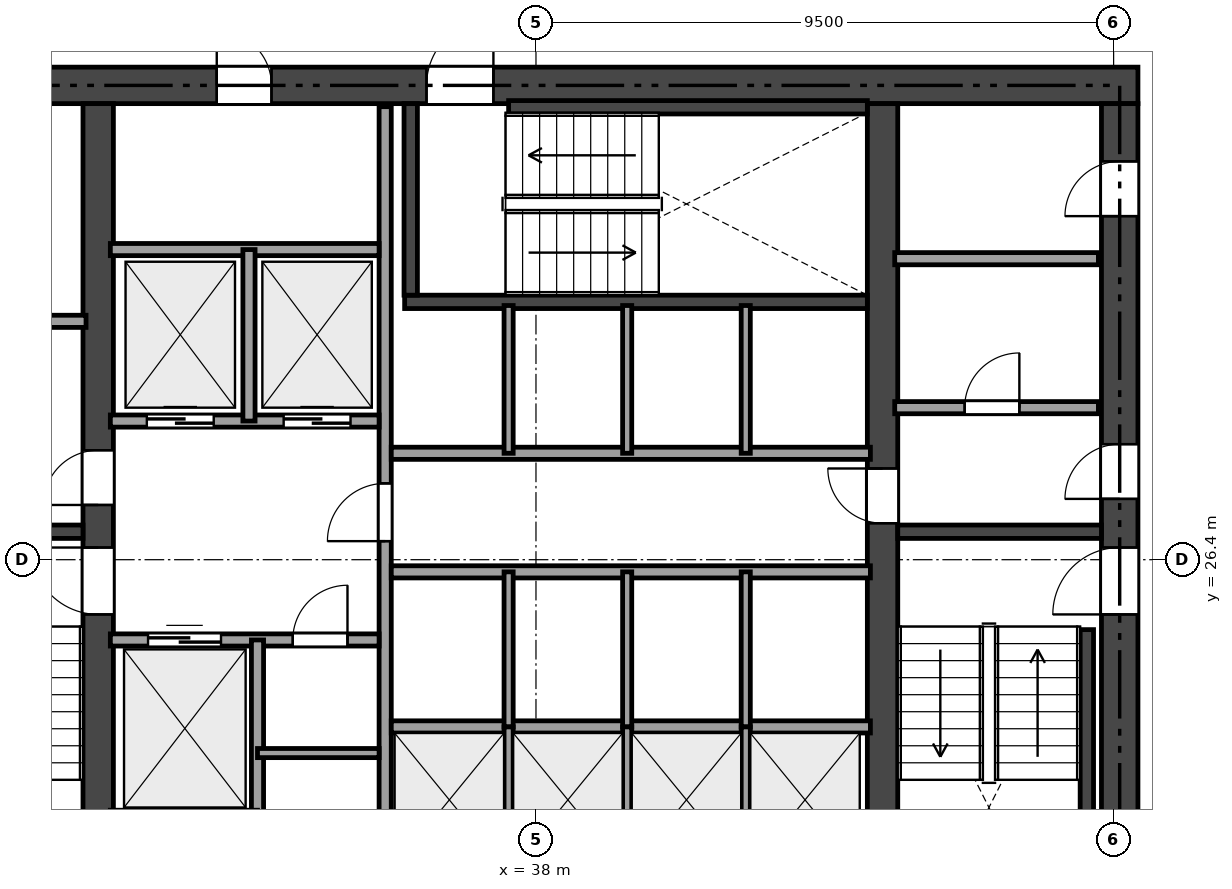
"""IFC4 building model, lengths in metres.
Left out: names, types, materials, properties, quantities, classifications, styles, units other than length and angle.
Written with IfcOpenShell. Run it as: python <this file> out.ifc"""

import sys

from ifc_helpers import new_model, si_unit, direction, frame, frame_2d, origin, place, context, subcontext, project, spatial, rectangle, extrude, element, fill, save


model = new_model("IFC4")
c1 = context("Model", 3, precision=1e-05, world=origin(), true_north=direction((0.0, 1.0)))
c2 = subcontext(c1, "Body", "Model", "MODEL_VIEW")
j1 = project(units=[si_unit("LENGTHUNIT", "METRE"), si_unit("PLANEANGLEUNIT", "RADIAN")], contexts=[c1])
p1 = place(None, origin())
s1 = spatial("IfcSite", under=j1, at=p1, CompositionType="ELEMENT")
p2 = place(p1, origin())
s2 = spatial("IfcBuilding", under=s1, at=p2, CompositionType="ELEMENT")
p3 = place(p2, frame((0.0, 0.0, 79.8)))
s3 = spatial("IfcBuildingStorey", under=s2, at=p3, CompositionType="ELEMENT", Elevation=79.8)
p4 = place(p3, frame((26.5, 34.2, 0.0), z_axis=(0.0, 0.0, 1.0), x_axis=(1.0, 0.0, 0.0)))
e1 = element("IfcWall", 1, at=p4, inside=s3, PredefinedType="SHEAR", context=c2, shape_type="SweptSolid", body=[
    extrude(rectangle(XDim=21.4, YDim=0.6, at=frame_2d((10.7, 0.0))), origin(), (0.0, 0.0, 1.0), 3.17),
])
p5 = place(p4, frame((9.7, 0.0, 0.0)))
e2 = element("IfcOpeningElement", 2, at=p5, cuts=e1, PredefinedType="OPENING", context=c2, shape_type="SweptSolid", body=[
    extrude(rectangle(XDim=1.1, YDim=2.15, at=frame_2d((0.55, 1.075))), frame((0.0, 0.31, 0.0), z_axis=(0.0, -1.0, 0.0), x_axis=(1.0, 0.0, 0.0)), (0.0, 0.0, 1.0), 0.62),
])
p6 = place(p4, frame((1.95, 0.0, 0.0)))
e3 = element("IfcOpeningElement", 3, at=p6, cuts=e1, PredefinedType="OPENING", context=c2, shape_type="SweptSolid", body=[
    extrude(rectangle(XDim=0.9, YDim=2.1, at=frame_2d((0.45, 1.05))), frame((0.0, 0.31, 0.0), z_axis=(0.0, -1.0, 0.0), x_axis=(1.0, 0.0, 0.0)), (0.0, 0.0, 1.0), 0.62),
])
p7 = place(p4, frame((6.25, 0.0, 0.0)))
e4 = element("IfcOpeningElement", 4, at=p7, cuts=e1, PredefinedType="OPENING", context=c2, shape_type="SweptSolid", body=[
    extrude(rectangle(XDim=0.9, YDim=2.1, at=frame_2d((0.45, 1.05))), frame((0.0, 0.31, 0.0), z_axis=(0.0, -1.0, 0.0), x_axis=(1.0, 0.0, 0.0)), (0.0, 0.0, 1.0), 0.62),
])
p8 = place(p3, frame((47.6, 18.9, 0.0), z_axis=(0.0, 0.0, 1.0), x_axis=(0.0, 1.0, 0.0)))
e5 = element("IfcWall", 5, at=p8, inside=s3, PredefinedType="SHEAR", context=c2, shape_type="SweptSolid", body=[
    extrude(rectangle(XDim=15.0, YDim=0.6, at=frame_2d((7.5, 0.0))), origin(), (0.0, 0.0, 1.0), 3.17),
])
p9 = place(p8, frame((6.6, 0.0, 0.0)))
e6 = element("IfcOpeningElement", 6, at=p9, cuts=e5, PredefinedType="OPENING", context=c2, shape_type="SweptSolid", body=[
    extrude(rectangle(XDim=1.1, YDim=2.15, at=frame_2d((0.55, 1.075))), frame((0.0, 0.31, 0.0), z_axis=(0.0, -1.0, 0.0), x_axis=(1.0, 0.0, 0.0)), (0.0, 0.0, 1.0), 0.62),
])
p10 = place(p8, frame((8.5, 0.0, 0.0)))
e7 = element("IfcOpeningElement", 7, at=p10, cuts=e5, PredefinedType="OPENING", context=c2, shape_type="SweptSolid", body=[
    extrude(rectangle(XDim=0.9, YDim=2.1, at=frame_2d((0.45, 1.05))), frame((0.0, 0.31, 0.0), z_axis=(0.0, -1.0, 0.0), x_axis=(1.0, 0.0, 0.0)), (0.0, 0.0, 1.0), 0.62),
])
p11 = place(p8, frame((13.15, 0.0, 0.0)))
e8 = element("IfcOpeningElement", 8, at=p11, cuts=e5, PredefinedType="OPENING", context=c2, shape_type="SweptSolid", body=[
    extrude(rectangle(XDim=0.9, YDim=2.1, at=frame_2d((0.45, 1.05))), frame((0.0, 0.31, 0.0), z_axis=(0.0, -1.0, 0.0), x_axis=(1.0, 0.0, 0.0)), (0.0, 0.0, 1.0), 0.62),
])
p12 = place(p3, frame((30.8, 18.9, 0.0), z_axis=(0.0, 0.0, 1.0), x_axis=(0.0, 1.0, 0.0)))
e9 = element("IfcWall", 9, at=p12, inside=s3, PredefinedType="SHEAR", context=c2, shape_type="SweptSolid", body=[
    extrude(rectangle(XDim=15.0, YDim=0.5, at=frame_2d((7.5, 0.0))), origin(), (0.0, 0.0, 1.0), 3.17),
])
p13 = place(p12, frame((6.6, 0.0, 0.0)))
e10 = element("IfcOpeningElement", 10, at=p13, cuts=e9, PredefinedType="OPENING", context=c2, shape_type="SweptSolid", body=[
    extrude(rectangle(XDim=1.1, YDim=2.15, at=frame_2d((0.55, 1.075))), frame((0.0, 0.26, 0.0), z_axis=(0.0, -1.0, 0.0), x_axis=(1.0, 0.0, 0.0)), (0.0, 0.0, 1.0), 0.52),
])
p14 = place(p12, frame((8.4, 0.0, 0.0)))
e11 = element("IfcOpeningElement", 11, at=p14, cuts=e9, PredefinedType="OPENING", context=c2, shape_type="SweptSolid", body=[
    extrude(rectangle(XDim=0.9, YDim=2.1, at=frame_2d((0.45, 1.05))), frame((0.0, 0.26, 0.0), z_axis=(0.0, -1.0, 0.0), x_axis=(1.0, 0.0, 0.0)), (0.0, 0.0, 1.0), 0.52),
])
p15 = place(p3, frame((43.7, 18.9, 0.0), z_axis=(0.0, 0.0, 1.0), x_axis=(0.0, 1.0, 0.0)))
e12 = element("IfcWall", 12, at=p15, inside=s3, PredefinedType="SHEAR", context=c2, shape_type="SweptSolid", body=[
    extrude(rectangle(XDim=15.0, YDim=0.5, at=frame_2d((7.5, 0.0))), origin(), (0.0, 0.0, 1.0), 3.17),
])
p16 = place(p15, frame((8.1, 0.0, 0.0)))
e13 = element("IfcOpeningElement", 13, at=p16, cuts=e12, PredefinedType="OPENING", context=c2, shape_type="SweptSolid", body=[
    extrude(rectangle(XDim=0.9, YDim=2.1, at=frame_2d((0.45, 1.05))), frame((0.0, 0.26, 0.0), z_axis=(0.0, -1.0, 0.0), x_axis=(1.0, 0.0, 0.0)), (0.0, 0.0, 1.0), 0.52),
])
p17 = place(p3, frame((27.1, 26.86, 0.0), z_axis=(0.0, 0.0, 1.0), x_axis=(1.0, 0.0, 0.0)))
e14 = element("IfcWall", 14, at=p17, inside=s3, PredefinedType="SHEAR", context=c2, shape_type="SweptSolid", body=[
    extrude(rectangle(XDim=3.45, YDim=0.22, at=frame_2d((1.725, 0.0))), origin(), (0.0, 0.0, 1.0), 3.17),
])
p18 = place(p3, frame((43.95, 26.86, 0.0), z_axis=(0.0, 0.0, 1.0), x_axis=(1.0, 0.0, 0.0)))
e15 = element("IfcWall", 15, at=p18, inside=s3, PredefinedType="SHEAR", context=c2, shape_type="SweptSolid", body=[
    extrude(rectangle(XDim=3.35, YDim=0.22, at=frame_2d((1.675, 0.0))), origin(), (0.0, 0.0, 1.0), 3.17),
])
p19 = place(p3, frame((47.06, 19.35, 0.0), z_axis=(0.0, 0.0, 1.0), x_axis=(0.0, 1.0, 0.0)))
e16 = element("IfcWall", 16, at=p19, inside=s3, PredefinedType="SHEAR", context=c2, shape_type="SweptSolid", body=[
    extrude(rectangle(XDim=5.9, YDim=0.22, at=frame_2d((2.95, 0.0))), origin(), (0.0, 0.0, 1.0), 3.17),
])
p20 = place(p3, frame((35.84, 30.64, 0.0), z_axis=(0.0, 0.0, 1.0), x_axis=(1.0, 0.0, 0.0)))
e17 = element("IfcWall", 17, at=p20, inside=s3, PredefinedType="SHEAR", context=c2, shape_type="SweptSolid", body=[
    extrude(rectangle(XDim=7.61, YDim=0.22, at=frame_2d((3.805, 0.0))), origin(), (0.0, 0.0, 1.0), 3.17),
])
p21 = place(p3, frame((35.94, 30.75, 0.0), z_axis=(0.0, 0.0, 1.0), x_axis=(0.0, 1.0, 0.0)))
e18 = element("IfcWall", 18, at=p21, inside=s3, PredefinedType="SHEAR", context=c2, shape_type="SweptSolid", body=[
    extrude(rectangle(XDim=3.15, YDim=0.22, at=frame_2d((1.575, 0.0))), origin(), (0.0, 0.0, 1.0), 3.17),
])
p22 = place(p3, frame((37.55, 33.84, 0.0), z_axis=(0.0, 0.0, 1.0), x_axis=(1.0, 0.0, 0.0)))
e19 = element("IfcWall", 19, at=p22, inside=s3, PredefinedType="SHEAR", context=c2, shape_type="SweptSolid", body=[
    extrude(rectangle(XDim=5.9, YDim=0.22, at=frame_2d((2.95, 0.0))), origin(), (0.0, 0.0, 1.0), 3.17),
])
p23 = place(p3, frame((27.15, 30.32, 0.0), z_axis=(0.0, 0.0, 1.0), x_axis=(1.0, 0.0, 0.0)))
e20 = element("IfcWall", 20, at=p23, inside=s3, PredefinedType="SOLIDWALL", context=c2, shape_type="SweptSolid", body=[
    extrude(rectangle(XDim=3.45, YDim=0.2, at=frame_2d((1.725, 0.0))), origin(), (0.0, 0.0, 1.0), 3.17),
])
p24 = place(p3, frame((43.9, 28.9, 0.0), z_axis=(0.0, 0.0, 1.0), x_axis=(1.0, 0.0, 0.0)))
e21 = element("IfcWall", 21, at=p24, inside=s3, PredefinedType="SOLIDWALL", context=c2, shape_type="SweptSolid", body=[
    extrude(rectangle(XDim=3.35, YDim=0.2, at=frame_2d((1.675, 0.0))), origin(), (0.0, 0.0, 1.0), 3.17),
])
p25 = place(p24, frame((1.15, 0.0, 0.0)))
e22 = element("IfcOpeningElement", 22, at=p25, cuts=e21, PredefinedType="OPENING", context=c2, shape_type="SweptSolid", body=[
    extrude(rectangle(XDim=0.9, YDim=2.1, at=frame_2d((0.45, 1.05))), frame((0.0, 0.11, 0.0), z_axis=(0.0, -1.0, 0.0), x_axis=(1.0, 0.0, 0.0)), (0.0, 0.0, 1.0), 0.22),
])
p26 = place(p3, frame((43.9, 31.35, 0.0), z_axis=(0.0, 0.0, 1.0), x_axis=(1.0, 0.0, 0.0)))
e23 = element("IfcWall", 23, at=p26, inside=s3, PredefinedType="SOLIDWALL", context=c2, shape_type="SweptSolid", body=[
    extrude(rectangle(XDim=3.35, YDim=0.2, at=frame_2d((1.675, 0.0))), origin(), (0.0, 0.0, 1.0), 3.17),
])
p27 = place(p3, frame((35.52, 18.95, 0.0), z_axis=(0.0, 0.0, 1.0), x_axis=(0.0, 1.0, 0.0)))
e24 = element("IfcWall", 24, at=p27, inside=s3, PredefinedType="SOLIDWALL", context=c2, shape_type="SweptSolid", body=[
    extrude(rectangle(XDim=14.9, YDim=0.2, at=frame_2d((7.45, 0.0))), origin(), (0.0, 0.0, 1.0), 2.691),
])
p28 = place(p27, frame((7.755, 0.0, 0.0)))
e25 = element("IfcOpeningElement", 25, at=p28, cuts=e24, PredefinedType="OPENING", context=c2, shape_type="SweptSolid", body=[
    extrude(rectangle(XDim=0.95, YDim=2.15, at=frame_2d((0.475, 1.075))), frame((0.0, 0.11, 0.0), z_axis=(0.0, -1.0, 0.0), x_axis=(1.0, 0.0, 0.0)), (0.0, 0.0, 1.0), 0.22),
])
p29 = place(p27, frame((0.6, 0.0, 0.0)))
e26 = element("IfcOpeningElement", 26, at=p29, cuts=e24, PredefinedType="OPENING", context=c2, shape_type="SweptSolid", body=[
    extrude(rectangle(XDim=0.9, YDim=2.1, at=frame_2d((0.45, 1.05))), frame((0.0, 0.11, 0.0), z_axis=(0.0, -1.0, 0.0), x_axis=(1.0, 0.0, 0.0)), (0.0, 0.0, 1.0), 0.22),
])
p30 = place(p3, frame((31.0, 28.68, 0.0), z_axis=(0.0, 0.0, 1.0), x_axis=(1.0, 0.0, 0.0)))
e27 = element("IfcWall", 27, at=p30, inside=s3, PredefinedType="SOLIDWALL", context=c2, shape_type="SweptSolid", body=[
    extrude(rectangle(XDim=4.42, YDim=0.2, at=frame_2d((2.21, 0.0))), origin(), (0.0, 0.0, 1.0), 3.17),
])
p31 = place(p30, frame((0.6, 0.0, 0.0)))
e28 = element("IfcOpeningElement", 28, at=p31, cuts=e27, PredefinedType="OPENING", context=c2, shape_type="SweptSolid", body=[
    extrude(rectangle(XDim=1.1, YDim=2.15, at=frame_2d((0.55, 1.075))), frame((0.0, 0.11, 0.0), z_axis=(0.0, -1.0, 0.0), x_axis=(1.0, 0.0, 0.0)), (0.0, 0.0, 1.0), 0.22),
])
p32 = place(p30, frame((2.85, 0.0, 0.0)))
e29 = element("IfcOpeningElement", 29, at=p32, cuts=e27, PredefinedType="OPENING", context=c2, shape_type="SweptSolid", body=[
    extrude(rectangle(XDim=1.1, YDim=2.15, at=frame_2d((0.55, 1.075))), frame((0.0, 0.11, 0.0), z_axis=(0.0, -1.0, 0.0), x_axis=(1.0, 0.0, 0.0)), (0.0, 0.0, 1.0), 0.22),
])
p33 = place(p3, frame((31.0, 31.5, 0.0), z_axis=(0.0, 0.0, 1.0), x_axis=(1.0, 0.0, 0.0)))
e30 = element("IfcWall", 30, at=p33, inside=s3, PredefinedType="SOLIDWALL", context=c2, shape_type="SweptSolid", body=[
    extrude(rectangle(XDim=4.42, YDim=0.2, at=frame_2d((2.21, 0.0))), origin(), (0.0, 0.0, 1.0), 3.17),
])
p34 = place(p3, frame((33.28, 28.68, 0.0), z_axis=(0.0, 0.0, 1.0), x_axis=(0.0, 1.0, 0.0)))
e31 = element("IfcWall", 31, at=p34, inside=s3, PredefinedType="SOLIDWALL", context=c2, shape_type="SweptSolid", body=[
    extrude(rectangle(XDim=2.82, YDim=0.2, at=frame_2d((1.41, 0.0))), origin(), (0.0, 0.0, 1.0), 3.17),
])
p35 = place(p3, frame((31.0, 25.08, 0.0), z_axis=(0.0, 0.0, 1.0), x_axis=(1.0, 0.0, 0.0)))
e32 = element("IfcWall", 32, at=p35, inside=s3, PredefinedType="SOLIDWALL", context=c2, shape_type="SweptSolid", body=[
    extrude(rectangle(XDim=4.42, YDim=0.2, at=frame_2d((2.21, 0.0))), origin(), (0.0, 0.0, 1.0), 3.17),
])
p36 = place(p35, frame((3.0, 0.0, 0.0)))
e33 = element("IfcOpeningElement", 33, at=p36, cuts=e32, PredefinedType="OPENING", context=c2, shape_type="SweptSolid", body=[
    extrude(rectangle(XDim=0.9, YDim=2.1, at=frame_2d((0.45, 1.05))), frame((0.0, 0.11, 0.0), z_axis=(0.0, -1.0, 0.0), x_axis=(1.0, 0.0, 0.0)), (0.0, 0.0, 1.0), 0.22),
])
p37 = place(p35, frame((0.62, 0.0, 0.0)))
e34 = element("IfcOpeningElement", 34, at=p37, cuts=e32, PredefinedType="OPENING", context=c2, shape_type="SweptSolid", body=[
    extrude(rectangle(XDim=1.2, YDim=2.15, at=frame_2d((0.6, 1.075))), frame((0.0, 0.11, 0.0), z_axis=(0.0, -1.0, 0.0), x_axis=(1.0, 0.0, 0.0)), (0.0, 0.0, 1.0), 0.22),
])
p38 = place(p3, frame((33.42, 18.95, 0.0), z_axis=(0.0, 0.0, 1.0), x_axis=(0.0, 1.0, 0.0)))
e35 = element("IfcWall", 35, at=p38, inside=s3, PredefinedType="SOLIDWALL", context=c2, shape_type="SweptSolid", body=[
    extrude(rectangle(XDim=6.13, YDim=0.2, at=frame_2d((3.065, 0.0))), origin(), (0.0, 0.0, 1.0), 2.691),
])
p39 = place(p3, frame((33.42, 23.22, 0.0), z_axis=(0.0, 0.0, 1.0), x_axis=(1.0, 0.0, 0.0)))
e36 = element("IfcWall", 36, at=p39, inside=s3, PredefinedType="PARTITIONING", context=c2, shape_type="SweptSolid", body=[
    extrude(rectangle(XDim=2.0, YDim=0.15, at=frame_2d((1.0, 0.0))), origin(), (0.0, 0.0, 1.0), 3.17),
])
for number, where, z_axis, x_axis in (
    (37, (35.62, 28.15, 0.0), (0.0, 0.0, 1.0), (1.0, 0.0, 0.0)),
    (38, (35.62, 26.2, 0.0), (0.0, 0.0, 1.0), (1.0, 0.0, 0.0)),
):
    element("IfcWall", number, at=place(p3, frame(where, z_axis=z_axis, x_axis=x_axis)), inside=s3, PredefinedType="SOLIDWALL", context=c2, shape_type="SweptSolid", body=[
        extrude(rectangle(XDim=7.88, YDim=0.2, at=frame_2d((3.94, 0.0))), origin(), (0.0, 0.0, 1.0), 3.17),
    ])
p40 = place(p3, frame((35.62, 23.65, 0.0), z_axis=(0.0, 0.0, 1.0), x_axis=(1.0, 0.0, 0.0)))
e39 = element("IfcWall", 39, at=p40, inside=s3, PredefinedType="SOLIDWALL", context=c2, shape_type="SweptSolid", body=[
    extrude(rectangle(XDim=7.88, YDim=0.2, at=frame_2d((3.94, 0.0))), origin(), (0.0, 0.0, 1.0), 2.691),
])
for number, where, z_axis, x_axis in (
    (40, (37.55, 28.15, 0.0), (0.0, 0.0, 1.0), (0.0, 1.0, 0.0)),
    (41, (39.5, 28.15, 0.0), (0.0, 0.0, 1.0), (0.0, 1.0, 0.0)),
    (42, (41.45, 28.15, 0.0), (0.0, 0.0, 1.0), (0.0, 1.0, 0.0)),
):
    element("IfcWall", number, at=place(p3, frame(where, z_axis=z_axis, x_axis=x_axis)), inside=s3, PredefinedType="PARTITIONING", context=c2, shape_type="SweptSolid", body=[
        extrude(rectangle(XDim=2.43, YDim=0.15, at=frame_2d((1.215, 0.0))), origin(), (0.0, 0.0, 1.0), 3.17),
    ])
for number, where, z_axis, x_axis in (
    (43, (37.55, 23.65, 0.0), (0.0, 0.0, 1.0), (0.0, 1.0, 0.0)),
    (44, (39.5, 23.65, 0.0), (0.0, 0.0, 1.0), (0.0, 1.0, 0.0)),
    (45, (41.45, 23.65, 0.0), (0.0, 0.0, 1.0), (0.0, 1.0, 0.0)),
):
    element("IfcWall", number, at=place(p3, frame(where, z_axis=z_axis, x_axis=x_axis)), inside=s3, PredefinedType="PARTITIONING", context=c2, shape_type="SweptSolid", body=[
        extrude(rectangle(XDim=2.55, YDim=0.15, at=frame_2d((1.275, 0.0))), origin(), (0.0, 0.0, 1.0), 2.691),
    ])
for number, where, z_axis, x_axis in (
    (46, (37.55, 21.25, 0.0), (0.0, 0.0, 1.0), (0.0, 1.0, 0.0)),
    (47, (39.5, 21.25, 0.0), (0.0, 0.0, 1.0), (0.0, 1.0, 0.0)),
    (48, (41.45, 21.25, 0.0), (0.0, 0.0, 1.0), (0.0, 1.0, 0.0)),
):
    element("IfcWall", number, at=place(p3, frame(where, z_axis=z_axis, x_axis=x_axis)), inside=s3, PredefinedType="PARTITIONING", context=c2, shape_type="SweptSolid", body=[
        extrude(rectangle(XDim=2.4, YDim=0.15, at=frame_2d((1.2, 0.0))), origin(), (0.0, 0.0, 1.0), 2.691),
    ])
p41 = place(p13, origin())
e49 = element("IfcDoor", 49, at=p41, inside=s3, OperationType="SINGLE_SWING_RIGHT", PredefinedType="DOOR", context=c2, shape_type="SweptSolid", body=[
    extrude(rectangle(XDim=1.1, YDim=2.15, at=frame_2d((0.55, 1.075))), frame((0.0, 0.025, 0.0), z_axis=(0.0, -1.0, 0.0), x_axis=(1.0, 0.0, 0.0)), (0.0, 0.0, 1.0), 0.05),
])
fill(e10, e49)
p42 = place(p9, origin())
e50 = element("IfcDoor", 50, at=p42, inside=s3, OperationType="SINGLE_SWING_LEFT", PredefinedType="DOOR", context=c2, shape_type="SweptSolid", body=[
    extrude(rectangle(XDim=1.1, YDim=2.15, at=frame_2d((0.55, 1.075))), frame((0.0, 0.025, 0.0), z_axis=(0.0, -1.0, 0.0), x_axis=(1.0, 0.0, 0.0)), (0.0, 0.0, 1.0), 0.05),
])
fill(e6, e50)
p43 = place(p5, origin())
e51 = element("IfcDoor", 51, at=p43, inside=s3, OperationType="SINGLE_SWING_RIGHT", PredefinedType="DOOR", context=c2, shape_type="SweptSolid", body=[
    extrude(rectangle(XDim=1.1, YDim=2.15, at=frame_2d((0.55, 1.075))), frame((0.0, 0.025, 0.0), z_axis=(0.0, -1.0, 0.0), x_axis=(1.0, 0.0, 0.0)), (0.0, 0.0, 1.0), 0.05),
])
fill(e2, e51)
p44 = place(p28, origin())
e52 = element("IfcDoor", 52, at=p44, inside=s3, OperationType="SINGLE_SWING_LEFT", PredefinedType="DOOR", context=c2, shape_type="SweptSolid", body=[
    extrude(rectangle(XDim=0.95, YDim=2.15, at=frame_2d((0.475, 1.075))), frame((0.0, 0.025, 0.0), z_axis=(0.0, -1.0, 0.0), x_axis=(1.0, 0.0, 0.0)), (0.0, 0.0, 1.0), 0.05),
])
fill(e25, e52)
p45 = place(p16, origin())
e53 = element("IfcDoor", 53, at=p45, inside=s3, OperationType="SINGLE_SWING_RIGHT", PredefinedType="DOOR", context=c2, shape_type="SweptSolid", body=[
    extrude(rectangle(XDim=0.9, YDim=2.1, at=frame_2d((0.45, 1.05))), frame((0.0, 0.025, 0.0), z_axis=(0.0, -1.0, 0.0), x_axis=(1.0, 0.0, 0.0)), (0.0, 0.0, 1.0), 0.05),
])
fill(e13, e53)
p46 = place(p10, origin())
e54 = element("IfcDoor", 54, at=p46, inside=s3, OperationType="SINGLE_SWING_LEFT", PredefinedType="DOOR", context=c2, shape_type="SweptSolid", body=[
    extrude(rectangle(XDim=0.9, YDim=2.1, at=frame_2d((0.45, 1.05))), frame((0.0, 0.025, 0.0), z_axis=(0.0, -1.0, 0.0), x_axis=(1.0, 0.0, 0.0)), (0.0, 0.0, 1.0), 0.05),
])
fill(e7, e54)
p47 = place(p14, origin())
e55 = element("IfcDoor", 55, at=p47, inside=s3, OperationType="SINGLE_SWING_LEFT", PredefinedType="DOOR", context=c2, shape_type="SweptSolid", body=[
    extrude(rectangle(XDim=0.9, YDim=2.1, at=frame_2d((0.45, 1.05))), frame((0.0, 0.025, 0.0), z_axis=(0.0, -1.0, 0.0), x_axis=(1.0, 0.0, 0.0)), (0.0, 0.0, 1.0), 0.05),
])
fill(e11, e55)
p48 = place(p7, origin())
e56 = element("IfcDoor", 56, at=p48, inside=s3, OperationType="SINGLE_SWING_LEFT", PredefinedType="DOOR", context=c2, shape_type="SweptSolid", body=[
    extrude(rectangle(XDim=0.9, YDim=2.1, at=frame_2d((0.45, 1.05))), frame((0.0, 0.025, 0.0), z_axis=(0.0, -1.0, 0.0), x_axis=(1.0, 0.0, 0.0)), (0.0, 0.0, 1.0), 0.05),
])
fill(e4, e56)
p49 = place(p25, origin())
e57 = element("IfcDoor", 57, at=p49, inside=s3, OperationType="SINGLE_SWING_RIGHT", PredefinedType="DOOR", context=c2, shape_type="SweptSolid", body=[
    extrude(rectangle(XDim=0.9, YDim=2.1, at=frame_2d((0.45, 1.05))), frame((0.0, 0.025, 0.0), z_axis=(0.0, -1.0, 0.0), x_axis=(1.0, 0.0, 0.0)), (0.0, 0.0, 1.0), 0.05),
])
fill(e22, e57)
p50 = place(p11, origin())
e58 = element("IfcDoor", 58, at=p50, inside=s3, OperationType="SINGLE_SWING_LEFT", PredefinedType="DOOR", context=c2, shape_type="SweptSolid", body=[
    extrude(rectangle(XDim=0.9, YDim=2.1, at=frame_2d((0.45, 1.05))), frame((0.0, 0.025, 0.0), z_axis=(0.0, -1.0, 0.0), x_axis=(1.0, 0.0, 0.0)), (0.0, 0.0, 1.0), 0.05),
])
fill(e8, e58)
p51 = place(p36, origin())
e59 = element("IfcDoor", 59, at=p51, inside=s3, OperationType="SINGLE_SWING_RIGHT", PredefinedType="DOOR", context=c2, shape_type="SweptSolid", body=[
    extrude(rectangle(XDim=0.9, YDim=2.1, at=frame_2d((0.45, 1.05))), frame((0.0, 0.025, 0.0), z_axis=(0.0, -1.0, 0.0), x_axis=(1.0, 0.0, 0.0)), (0.0, 0.0, 1.0), 0.05),
])
fill(e33, e59)
p52 = place(p31, origin())
e60 = element("IfcDoor", 60, at=p52, inside=s3, OperationType="SLIDING_TO_LEFT", PredefinedType="DOOR", context=c2, shape_type="SweptSolid", body=[
    extrude(rectangle(XDim=1.1, YDim=2.15, at=frame_2d((0.55, 1.075))), frame((0.0, 0.025, 0.0), z_axis=(0.0, -1.0, 0.0), x_axis=(1.0, 0.0, 0.0)), (0.0, 0.0, 1.0), 0.05),
])
fill(e28, e60)
p53 = place(p32, origin())
e61 = element("IfcDoor", 61, at=p53, inside=s3, OperationType="SLIDING_TO_LEFT", PredefinedType="DOOR", context=c2, shape_type="SweptSolid", body=[
    extrude(rectangle(XDim=1.1, YDim=2.15, at=frame_2d((0.55, 1.075))), frame((0.0, 0.025, 0.0), z_axis=(0.0, -1.0, 0.0), x_axis=(1.0, 0.0, 0.0)), (0.0, 0.0, 1.0), 0.05),
])
fill(e29, e61)
p54 = place(p37, origin())
e62 = element("IfcDoor", 62, at=p54, inside=s3, OperationType="SLIDING_TO_LEFT", PredefinedType="DOOR", context=c2, shape_type="SweptSolid", body=[
    extrude(rectangle(XDim=1.2, YDim=2.15, at=frame_2d((0.6, 1.075))), frame((0.0, 0.025, 0.0), z_axis=(0.0, -1.0, 0.0), x_axis=(1.0, 0.0, 0.0)), (0.0, 0.0, 1.0), 0.05),
])
fill(e34, e62)
save(model, sys.argv[1])
